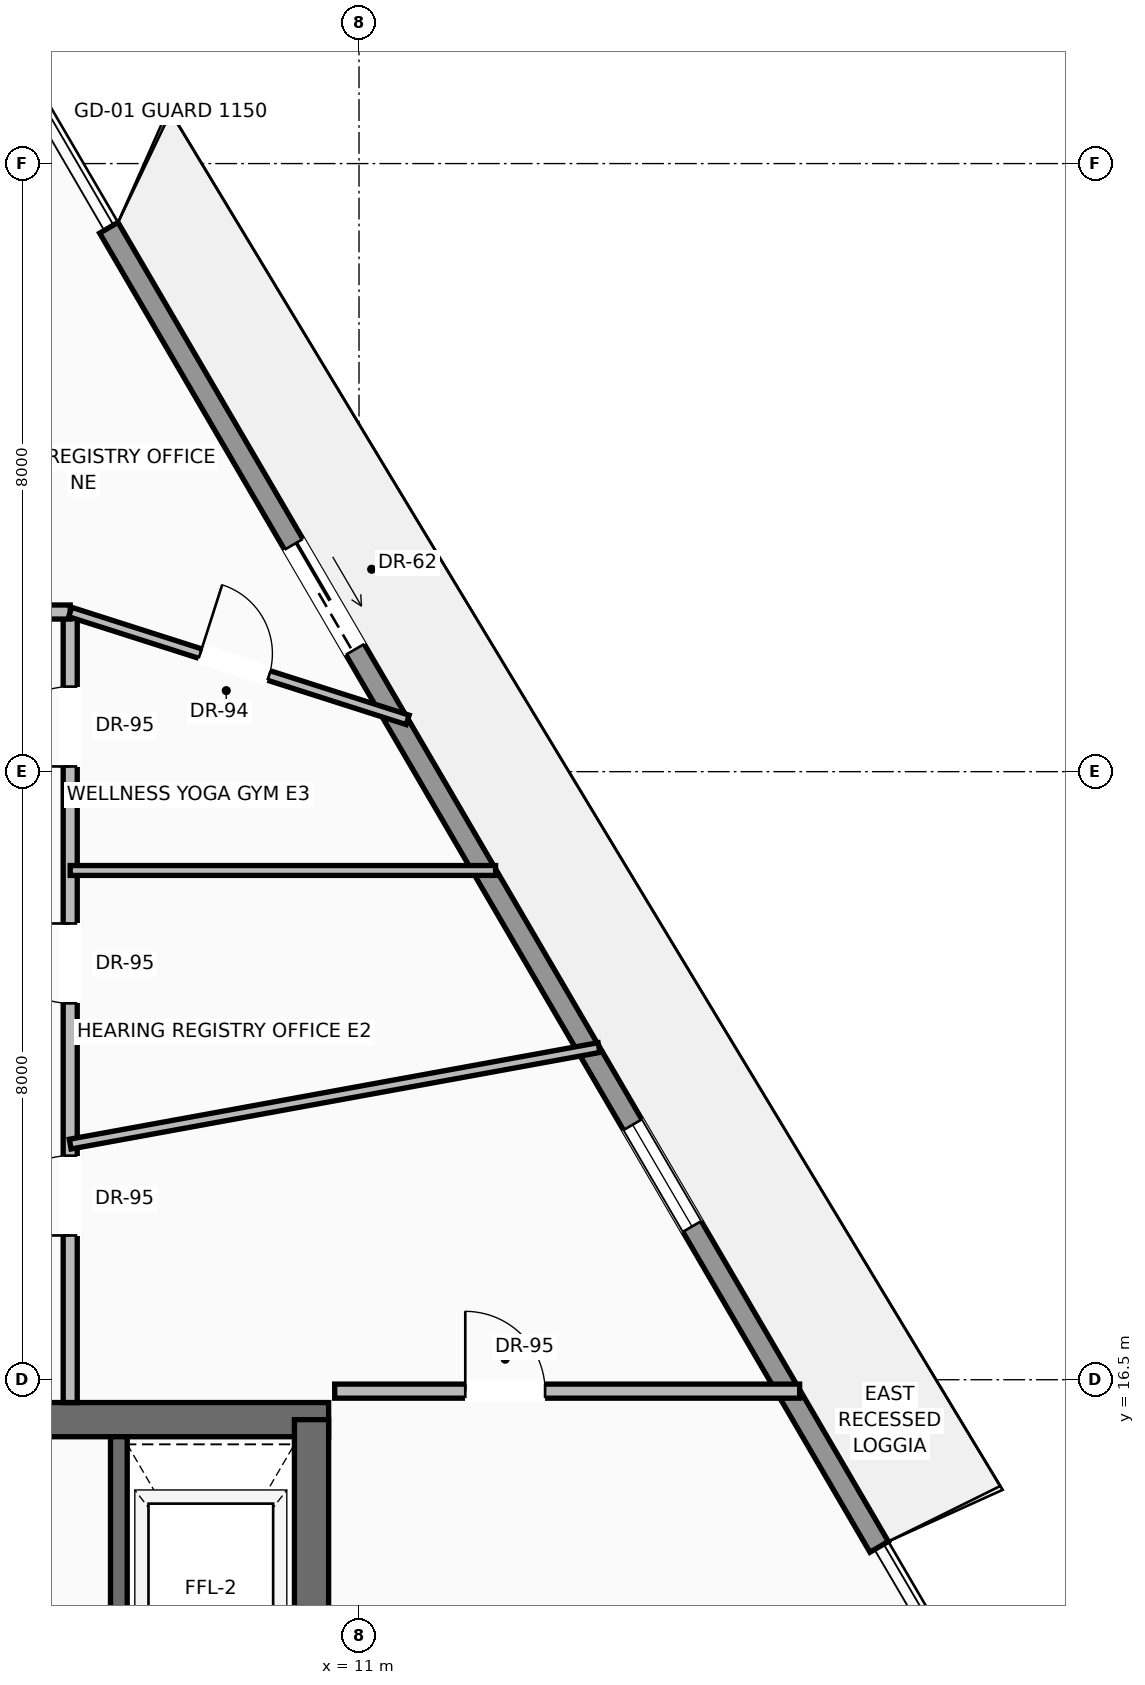
"""IFC4 building model, lengths in metres.
Left out: names, types, materials, properties, quantities, classifications, styles, units other than length and angle.
Written with IfcOpenShell. Run it as: python <this file> out.ifc"""

import sys

from ifc_helpers import new_model, si_unit, direction, frame, frame_2d, origin, place, context, subcontext, project, spatial, rectangle, extrude, source, transform, mapped, element, fill, save


model = new_model("IFC4")
c1 = context("Model", 3, precision=1e-05, world=origin(), true_north=direction((0.0, 1.0)))
c2 = subcontext(c1, "Body", "Model", "MODEL_VIEW")
j1 = project(units=[si_unit("LENGTHUNIT", "METRE"), si_unit("PLANEANGLEUNIT", "RADIAN")], contexts=[c1])
p1 = place(None, origin())
s1 = spatial("IfcSite", under=j1, at=p1, CompositionType="ELEMENT")
p2 = place(p1, origin())
s2 = spatial("IfcBuilding", under=s1, at=p2, CompositionType="ELEMENT")
p3 = place(p2, frame((0.0, 0.0, 286.8)))
s3 = spatial("IfcBuildingStorey", under=s2, at=p3, CompositionType="ELEMENT", Elevation=286.8)
p4 = place(p3, frame((-10.6, 15.975, 0.0), z_axis=(0.0, 0.0, 1.0), x_axis=(1.0, 0.0, 0.0)))
e1 = element("IfcWall", 1, at=p4, inside=s3, PredefinedType="SHEAR", context=c2, shape_type="SweptSolid", body=[
    extrude(rectangle(XDim=21.2, YDim=0.45, at=frame_2d((10.6, 0.0))), origin(), (0.0, 0.0, 1.0), 3.24),
])
p5 = place(p4, frame((3.17, 0.0, 0.0)))
e2 = element("IfcOpeningElement", 2, at=p5, cuts=e1, PredefinedType="OPENING", context=c2, shape_type="SweptSolid", body=[
    extrude(rectangle(XDim=1.3, YDim=2.3, at=frame_2d((0.65, 1.15))), frame((0.0, 0.235, 0.0), z_axis=(0.0, -1.0, 0.0), x_axis=(1.0, 0.0, 0.0)), (0.0, 0.0, 1.0), 0.47),
])
p6 = place(p4, frame((9.6, 0.0, 0.0)))
e3 = element("IfcOpeningElement", 3, at=p6, cuts=e1, PredefinedType="OPENING", context=c2, shape_type="SweptSolid", body=[
    extrude(rectangle(XDim=2.0, YDim=2.4, at=frame_2d((1.0, 1.2))), frame((0.0, 0.235, 0.0), z_axis=(0.0, -1.0, 0.0), x_axis=(1.0, 0.0, 0.0)), (0.0, 0.0, 1.0), 0.47),
])
p7 = place(p3, frame((10.375, 0.625, 0.0), z_axis=(0.0, 0.0, 1.0), x_axis=(0.0, 1.0, 0.0)))
e4 = element("IfcWall", 4, at=p7, inside=s3, PredefinedType="SHEAR", context=c2, shape_type="SweptSolid", body=[
    extrude(rectangle(XDim=15.35, YDim=0.45, at=frame_2d((7.675, 0.0))), origin(), (0.0, 0.0, 1.0), 3.24),
])
p8 = place(p3, frame((7.708, 31.656, 0.0), z_axis=(0.0, 0.0, 1.0), x_axis=(0.504292445958, -0.86353293449, 0.0)))
e5 = element("IfcWall", 5, at=p8, inside=s3, PredefinedType="SOLIDWALL", context=c2, shape_type="SweptSolid", body=[
    extrude(rectangle(XDim=20.096, YDim=0.28, at=frame_2d((10.048, 0.0))), origin(), (0.0, 0.0, 1.0), 2.82),
])
p9 = place(p8, frame((4.823, 0.0, 0.0)))
e6 = element("IfcOpeningElement", 6, at=p9, cuts=e5, PredefinedType="OPENING", context=c2, shape_type="SweptSolid", body=[
    extrude(rectangle(XDim=1.6, YDim=2.35, at=frame_2d((0.8, 1.175))), frame((0.0, 0.15, 0.0), z_axis=(0.0, -1.0, 0.0), x_axis=(1.0, 0.0, 0.0)), (0.0, 0.0, 1.0), 0.3),
])
p10 = place(p8, frame((13.666, 0.0, 0.9)))
e7 = element("IfcOpeningElement", 7, at=p10, cuts=e5, PredefinedType="OPENING", context=c2, shape_type="SweptSolid", body=[
    extrude(rectangle(XDim=1.55, YDim=1.75, at=frame_2d((0.775, 0.875))), frame((0.0, 0.15, 0.0), z_axis=(0.0, -1.0, 0.0), x_axis=(1.0, 0.0, 0.0)), (0.0, 0.0, 1.0), 0.3),
])
p11 = place(p3, frame((7.84, 11.87, 0.0), z_axis=(0.0, 0.0, 1.0), x_axis=(0.0, 1.0, 0.0)))
e8 = element("IfcWall", 8, at=p11, inside=s3, PredefinedType="SOLIDWALL", context=c2, shape_type="SweptSolid", body=[
    extrude(rectangle(XDim=3.88, YDim=0.22, at=frame_2d((1.94, 0.0))), origin(), (0.0, 0.0, 1.0), 3.24),
])
p12 = place(p3, frame((7.2, 16.2, 0.0), z_axis=(0.0, 0.0, 1.0), x_axis=(0.0, 1.0, 0.0)))
e9 = element("IfcWall", 9, at=p12, inside=s3, PredefinedType="PARTITIONING", context=c2, shape_type="SweptSolid", body=[
    extrude(rectangle(XDim=10.4, YDim=0.185, at=frame_2d((5.2, 0.0))), origin(), (0.0, 0.0, 1.0), 3.232),
])
p13 = place(p12, frame((2.198, 0.0, 0.0)))
e10 = element("IfcOpeningElement", 10, at=p13, cuts=e9, PredefinedType="OPENING", context=c2, shape_type="SweptSolid", body=[
    extrude(rectangle(XDim=1.05, YDim=2.25, at=frame_2d((0.525, 1.125))), frame((0.0, 0.103, 0.0), z_axis=(0.0, -1.0, 0.0), x_axis=(1.0, 0.0, 0.0)), (0.0, 0.0, 1.0), 0.205),
])
p14 = place(p12, frame((5.252, 0.0, 0.0)))
e11 = element("IfcOpeningElement", 11, at=p14, cuts=e9, PredefinedType="OPENING", context=c2, shape_type="SweptSolid", body=[
    extrude(rectangle(XDim=1.05, YDim=2.25, at=frame_2d((0.525, 1.125))), frame((0.0, 0.103, 0.0), z_axis=(0.0, -1.0, 0.0), x_axis=(1.0, 0.0, 0.0)), (0.0, 0.0, 1.0), 0.205),
])
p15 = place(p12, frame((8.369, 0.0, 0.0)))
e12 = element("IfcOpeningElement", 12, at=p15, cuts=e9, PredefinedType="OPENING", context=c2, shape_type="SweptSolid", body=[
    extrude(rectangle(XDim=1.05, YDim=2.25, at=frame_2d((0.525, 1.125))), frame((0.0, 0.103, 0.0), z_axis=(0.0, -1.0, 0.0), x_axis=(1.0, 0.0, 0.0)), (0.0, 0.0, 1.0), 0.205),
])
p16 = place(p3, frame((-7.2, 26.6, 0.0), z_axis=(0.0, 0.0, 1.0), x_axis=(1.0, 0.0, 0.0)))
e13 = element("IfcWall", 13, at=p16, inside=s3, PredefinedType="PARTITIONING", context=c2, shape_type="SweptSolid", body=[
    extrude(rectangle(XDim=14.4, YDim=0.185, at=frame_2d((7.2, 0.0))), origin(), (0.0, 0.0, 1.0), 3.232),
])
p17 = place(p16, frame((4.698, 0.0, 0.0)))
e14 = element("IfcOpeningElement", 14, at=p17, cuts=e13, PredefinedType="OPENING", context=c2, shape_type="SweptSolid", body=[
    extrude(rectangle(XDim=1.05, YDim=2.25, at=frame_2d((0.525, 1.125))), frame((0.0, 0.103, 0.0), z_axis=(0.0, -1.0, 0.0), x_axis=(1.0, 0.0, 0.0)), (0.0, 0.0, 1.0), 0.205),
])
p18 = place(p16, frame((6.675, 0.0, 0.0)))
e15 = element("IfcOpeningElement", 15, at=p18, cuts=e13, PredefinedType="OPENING", context=c2, shape_type="SweptSolid", body=[
    extrude(rectangle(XDim=1.05, YDim=2.25, at=frame_2d((0.525, 1.125))), frame((0.0, 0.103, 0.0), z_axis=(0.0, -1.0, 0.0), x_axis=(1.0, 0.0, 0.0)), (0.0, 0.0, 1.0), 0.205),
])
p19 = place(p16, frame((8.653, 0.0, 0.0)))
e16 = element("IfcOpeningElement", 16, at=p19, cuts=e13, PredefinedType="OPENING", context=c2, shape_type="SweptSolid", body=[
    extrude(rectangle(XDim=1.05, YDim=2.25, at=frame_2d((0.525, 1.125))), frame((0.0, 0.103, 0.0), z_axis=(0.0, -1.0, 0.0), x_axis=(1.0, 0.0, 0.0)), (0.0, 0.0, 1.0), 0.205),
])
p20 = place(p3, frame((10.68, 16.35, 0.0), z_axis=(0.0, 0.0, 1.0), x_axis=(1.0, 0.0, 0.0)))
e17 = element("IfcWall", 17, at=p20, inside=s3, PredefinedType="PARTITIONING", context=c2, shape_type="SweptSolid", body=[
    extrude(rectangle(XDim=6.117, YDim=0.185, at=frame_2d((3.059, 0.0))), origin(), (0.0, 0.0, 1.0), 3.232),
])
p21 = place(p20, frame((1.718, 0.0, 0.0)))
e18 = element("IfcOpeningElement", 18, at=p21, cuts=e17, PredefinedType="OPENING", context=c2, shape_type="SweptSolid", body=[
    extrude(rectangle(XDim=1.05, YDim=2.25, at=frame_2d((0.525, 1.125))), frame((0.0, 0.103, 0.0), z_axis=(0.0, -1.0, 0.0), x_axis=(1.0, 0.0, 0.0)), (0.0, 0.0, 1.0), 0.205),
])
p22 = place(p3, frame((7.2, 26.6, 0.0), z_axis=(0.0, 0.0, 1.0), x_axis=(0.952553600786, -0.304370888275, 0.0)))
e19 = element("IfcWall", 19, at=p22, inside=s3, PredefinedType="PARTITIONING", context=c2, shape_type="SweptSolid", body=[
    extrude(rectangle(XDim=4.661, YDim=0.13, at=frame_2d((2.331, 0.0))), origin(), (0.0, 0.0, 1.0), 3.232),
])
p23 = place(p22, frame((1.796, 0.0, 0.0)))
e20 = element("IfcOpeningElement", 20, at=p23, cuts=e19, PredefinedType="OPENING", context=c2, shape_type="SweptSolid", body=[
    extrude(rectangle(XDim=0.95, YDim=2.2, at=frame_2d((0.475, 1.1))), frame((0.0, 0.075, 0.0), z_axis=(0.0, -1.0, 0.0), x_axis=(1.0, 0.0, 0.0)), (0.0, 0.0, 1.0), 0.15),
])
p24 = place(p3, frame((7.2, 19.6, 0.0), z_axis=(0.0, 0.0, 1.0), x_axis=(0.983744847031, 0.179571924144, 0.0)))
e21 = element("IfcWall", 21, at=p24, inside=s3, PredefinedType="PARTITIONING", context=c2, shape_type="SweptSolid", body=[
    extrude(rectangle(XDim=7.073, YDim=0.13, at=frame_2d((3.536, 0.0))), origin(), (0.0, 0.0, 1.0), 2.885),
])
p25 = place(p3, frame((7.2, 23.2, 0.0), z_axis=(0.0, 0.0, 1.0), x_axis=(1.0, 0.0, 0.0)))
e22 = element("IfcWall", 22, at=p25, inside=s3, PredefinedType="PARTITIONING", context=c2, shape_type="SweptSolid", body=[
    extrude(rectangle(XDim=5.597, YDim=0.13, at=frame_2d((2.798, 0.0))), origin(), (0.0, 0.0, 1.0), 3.232),
])
m1 = source(origin(), c2, "Body", "SweptSolid", [
    extrude(rectangle(XDim=1.6, YDim=2.35, at=frame_2d((0.8, 1.175))), frame((0.0, 0.025, 0.0), z_axis=(0.0, -1.0, 0.0), x_axis=(1.0, 0.0, 0.0)), (0.0, 0.0, 1.0), 0.05),
])
p26 = place(p9, origin())
e23 = element("IfcDoor", 23, at=p26, inside=s3, OperationType="SLIDING_TO_RIGHT", PredefinedType="DOOR", context=c2, shape_type="MappedRepresentation", body=[
    mapped(m1, transform((0.0, 0.0, 0.0), scale=1.0)),
])
fill(e6, e23)
m2 = source(origin(), c2, "Body", "SweptSolid", [
    extrude(rectangle(XDim=1.55, YDim=1.75, at=frame_2d((0.775, 0.875))), frame((0.0, 0.03, 0.0), z_axis=(0.0, -1.0, 0.0), x_axis=(1.0, 0.0, 0.0)), (0.0, 0.0, 1.0), 0.06),
])
p27 = place(p10, origin())
e24 = element("IfcWindow", 24, at=p27, inside=s3, PartitioningType="SINGLE_PANEL", PredefinedType="WINDOW", context=c2, shape_type="MappedRepresentation", body=[
    mapped(m2, transform((0.0, 0.0, 0.0), scale=1.0)),
])
fill(e7, e24)
m3 = source(origin(), c2, "Body", "SweptSolid", [
    extrude(rectangle(XDim=1.05, YDim=2.25, at=frame_2d((0.525, 1.125))), frame((0.0, 0.025, 0.0), z_axis=(0.0, -1.0, 0.0), x_axis=(1.0, 0.0, 0.0)), (0.0, 0.0, 1.0), 0.05),
])
p28 = place(p21, origin())
e25 = element("IfcDoor", 25, at=p28, inside=s3, OperationType="SINGLE_SWING_LEFT", PredefinedType="DOOR", context=c2, shape_type="MappedRepresentation", body=[
    mapped(m3, transform((0.0, 0.0, 0.0), scale=1.0)),
])
fill(e18, e25)
p29 = place(p13, origin())
e26 = element("IfcDoor", 26, at=p29, inside=s3, OperationType="SINGLE_SWING_LEFT", PredefinedType="DOOR", context=c2, shape_type="MappedRepresentation", body=[
    mapped(m3, transform((0.0, 0.0, 0.0), scale=1.0)),
])
fill(e10, e26)
p30 = place(p14, origin())
e27 = element("IfcDoor", 27, at=p30, inside=s3, OperationType="SINGLE_SWING_RIGHT", PredefinedType="DOOR", context=c2, shape_type="MappedRepresentation", body=[
    mapped(m3, transform((0.0, 0.0, 0.0), scale=1.0)),
])
fill(e11, e27)
p31 = place(p15, origin())
e28 = element("IfcDoor", 28, at=p31, inside=s3, OperationType="SINGLE_SWING_LEFT", PredefinedType="DOOR", context=c2, shape_type="MappedRepresentation", body=[
    mapped(m3, transform((0.0, 0.0, 0.0), scale=1.0)),
])
fill(e12, e28)
m4 = source(origin(), c2, "Body", "SweptSolid", [
    extrude(rectangle(XDim=0.95, YDim=2.2, at=frame_2d((0.475, 1.1))), frame((0.0, 0.025, 0.0), z_axis=(0.0, -1.0, 0.0), x_axis=(1.0, 0.0, 0.0)), (0.0, 0.0, 1.0), 0.05),
])
p32 = place(p23, origin())
e29 = element("IfcDoor", 29, at=p32, inside=s3, OperationType="SINGLE_SWING_LEFT", PredefinedType="DOOR", context=c2, shape_type="MappedRepresentation", body=[
    mapped(m4, transform((0.0, 0.0, 0.0), scale=1.0)),
])
fill(e20, e29)
save(model, sys.argv[1])
